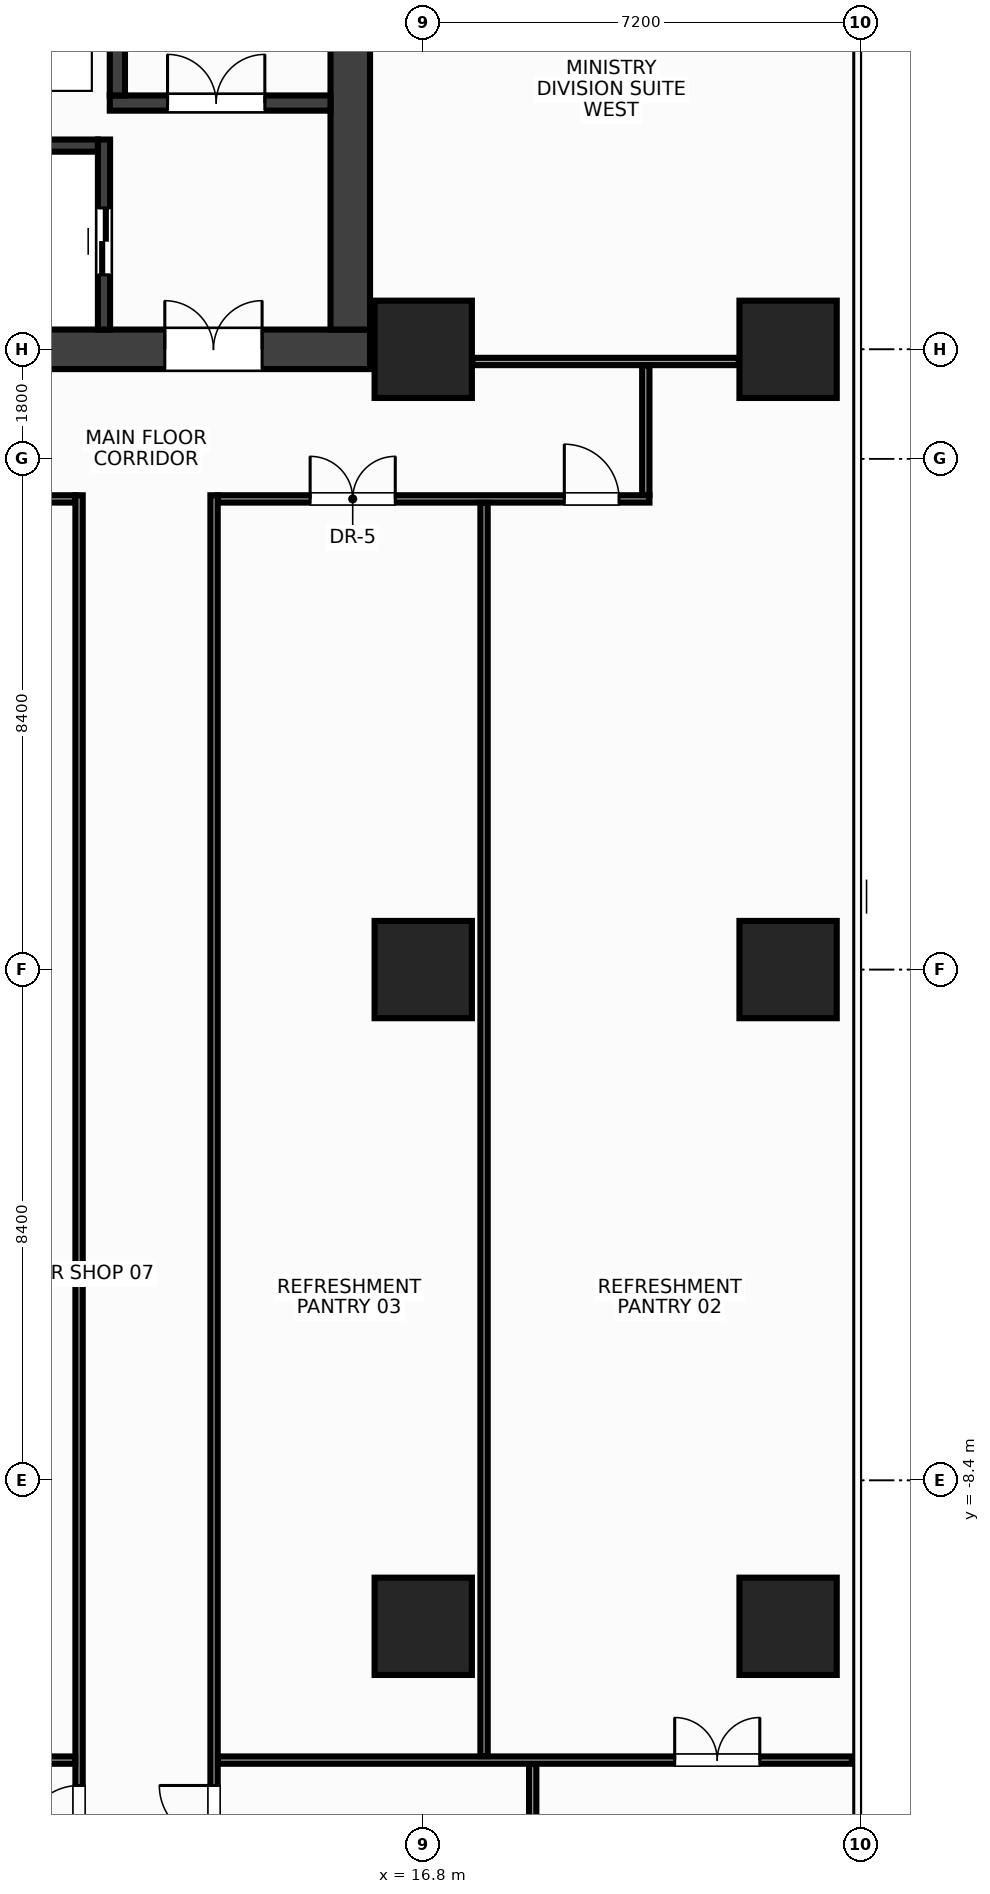
"""IFC4 building model, lengths in metres.
Left out: names, types, materials, properties, quantities, classifications, styles, units other than length and angle.
Written with IfcOpenShell. Run it as: python <this file> out.ifc"""

import sys

from ifc_helpers import new_model, si_unit, direction, frame, frame_2d, origin, origin_2d, place, context, subcontext, project, spatial, rectangle, extrude, source, transform, mapped, element, fill, save


model = new_model("IFC4")
c1 = context("Model", 3, precision=1e-05, world=origin(), true_north=direction((0.0, 1.0)))
c2 = subcontext(c1, "Body", "Model", "MODEL_VIEW")
j1 = project(units=[si_unit("LENGTHUNIT", "METRE"), si_unit("PLANEANGLEUNIT", "RADIAN")], contexts=[c1])
p1 = place(None, origin())
s1 = spatial("IfcSite", under=j1, at=p1, CompositionType="ELEMENT")
p2 = place(p1, origin())
s2 = spatial("IfcBuilding", under=s1, at=p2, CompositionType="ELEMENT")
p3 = place(p2, frame((0.0, 0.0, 178.4)))
s3 = spatial("IfcBuildingStorey", under=s2, at=p3, CompositionType="ELEMENT", Elevation=178.4)
m1 = source(origin(), c2, "Body", "SweptSolid", [
    extrude(rectangle(XDim=31.85, YDim=0.65, at=frame_2d((15.925, 0.0))), origin(), (0.0, 0.0, 1.0), 3.6),
])
p4 = place(p3, frame((-15.925, 10.2, 0.0), z_axis=(0.0, 0.0, 1.0), x_axis=(1.0, 0.0, 0.0)))
e1 = element("IfcWall", 1, at=p4, inside=s3, PredefinedType="SHEAR", context=c2, shape_type="MappedRepresentation", body=[
    mapped(m1, transform((0.0, 0.0, 0.0), x_axis=(1.0, 0.0, 0.0), y_axis=(0.0, 1.0, 0.0), z_axis=(0.0, 0.0, 1.0), scale=1.0)),
])
p5 = place(p4, frame((1.775, 0.0, 0.0)))
e2 = element("IfcOpeningElement", 2, at=p5, cuts=e1, PredefinedType="OPENING", context=c2, shape_type="SweptSolid", body=[
    extrude(rectangle(XDim=1.6, YDim=2.15, at=frame_2d((0.8, 1.075))), frame((0.0, 0.337, 0.0), z_axis=(0.0, -1.0, 0.0), x_axis=(1.0, 0.0, 0.0)), (0.0, 0.0, 1.0), 0.674),
])
p6 = place(p4, frame((28.475, 0.0, 0.0)))
e3 = element("IfcOpeningElement", 3, at=p6, cuts=e1, PredefinedType="OPENING", context=c2, shape_type="SweptSolid", body=[
    extrude(rectangle(XDim=1.6, YDim=2.15, at=frame_2d((0.8, 1.075))), frame((0.0, 0.337, 0.0), z_axis=(0.0, -1.0, 0.0), x_axis=(1.0, 0.0, 0.0)), (0.0, 0.0, 1.0), 0.674),
])
p7 = place(p4, frame((15.175, 0.0, 0.0)))
e4 = element("IfcOpeningElement", 4, at=p7, cuts=e1, PredefinedType="OPENING", context=c2, shape_type="SweptSolid", body=[
    extrude(rectangle(XDim=1.5, YDim=2.2, at=frame_2d((0.75, 1.1))), frame((0.0, 0.337, 0.0), z_axis=(0.0, -1.0, 0.0), x_axis=(1.0, 0.0, 0.0)), (0.0, 0.0, 1.0), 0.674),
])
m2 = source(origin(), c2, "Body", "SweptSolid", [
    extrude(rectangle(XDim=12.95, YDim=0.65, at=frame_2d((6.475, 0.0))), origin(), (0.0, 0.0, 1.0), 3.6),
])
p8 = place(p3, frame((15.6, 10.525, 0.0), z_axis=(0.0, 0.0, 1.0), x_axis=(0.0, 1.0, 0.0)))
e5 = element("IfcWall", 5, at=p8, inside=s3, PredefinedType="SHEAR", context=c2, shape_type="MappedRepresentation", body=[
    mapped(m2, transform((0.0, 0.0, 0.0), x_axis=(1.0, 0.0, 0.0), y_axis=(0.0, 1.0, 0.0), z_axis=(0.0, 0.0, 1.0), scale=1.0)),
])
m3 = source(origin(), c2, "Body", "SweptSolid", [
    extrude(rectangle(XDim=3.63, YDim=0.25, at=frame_2d((1.815, 0.0))), origin(), (0.0, 0.0, 1.0), 3.6),
])
p9 = place(p3, frame((11.645, 14.25, 0.0), z_axis=(0.0, 0.0, 1.0), x_axis=(1.0, 0.0, 0.0)))
e6 = element("IfcWall", 6, at=p9, inside=s3, PredefinedType="SHEAR", context=c2, shape_type="MappedRepresentation", body=[
    mapped(m3, transform((0.0, 0.0, 0.0), x_axis=(1.0, 0.0, 0.0), y_axis=(0.0, 1.0, 0.0), z_axis=(0.0, 0.0, 1.0), scale=1.0)),
])
p10 = place(p9, frame((0.95, 0.0, 0.0)))
e7 = element("IfcOpeningElement", 7, at=p10, cuts=e6, PredefinedType="OPENING", context=c2, shape_type="SweptSolid", body=[
    extrude(rectangle(XDim=1.6, YDim=2.15, at=frame_2d((0.8, 1.075))), frame((0.0, 0.137, 0.0), z_axis=(0.0, -1.0, 0.0), x_axis=(1.0, 0.0, 0.0)), (0.0, 0.0, 1.0), 0.274),
])
m4 = source(origin(), c2, "Body", "SweptSolid", [
    extrude(rectangle(XDim=9.1, YDim=0.25, at=frame_2d((4.55, 0.0))), origin(), (0.0, 0.0, 1.0), 3.6),
])
p11 = place(p3, frame((11.77, 14.375, 0.0), z_axis=(0.0, 0.0, 1.0), x_axis=(0.0, 1.0, 0.0)))
e8 = element("IfcWall", 8, at=p11, inside=s3, PredefinedType="SHEAR", context=c2, shape_type="MappedRepresentation", body=[
    mapped(m4, transform((0.0, 0.0, 0.0), x_axis=(1.0, 0.0, 0.0), y_axis=(0.0, 1.0, 0.0), z_axis=(0.0, 0.0, 1.0), scale=1.0)),
])
m5 = source(origin(), c2, "Body", "SweptSolid", [
    extrude(rectangle(XDim=3.125, YDim=0.2, at=frame_2d((1.562, 0.0))), origin(), (0.0, 0.0, 1.0), 3.6),
])
p12 = place(p3, frame((11.55, 10.525, 0.0), z_axis=(0.0, 0.0, 1.0), x_axis=(0.0, 1.0, 0.0)))
e9 = element("IfcWall", 9, at=p12, inside=s3, PredefinedType="SHEAR", context=c2, shape_type="MappedRepresentation", body=[
    mapped(m5, transform((0.0, 0.0, 0.0), x_axis=(1.0, 0.0, 0.0), y_axis=(0.0, 1.0, 0.0), z_axis=(0.0, 0.0, 1.0), scale=1.0)),
])
p13 = place(p12, frame((0.9, 0.0, 0.0)))
e10 = element("IfcOpeningElement", 10, at=p13, cuts=e9, PredefinedType="OPENING", context=c2, shape_type="SweptSolid", body=[
    extrude(rectangle(XDim=1.1, YDim=2.15, at=frame_2d((0.55, 1.075))), frame((0.0, 0.112, 0.0), z_axis=(0.0, -1.0, 0.0), x_axis=(1.0, 0.0, 0.0)), (0.0, 0.0, 1.0), 0.224),
])
m6 = source(origin(), c2, "Body", "SweptSolid", [
    extrude(rectangle(XDim=2.825, YDim=0.2, at=frame_2d((1.413, 0.0))), origin(), (0.0, 0.0, 1.0), 3.6),
])
p14 = place(p3, frame((8.625, 13.55, 0.0), z_axis=(0.0, 0.0, 1.0), x_axis=(1.0, 0.0, 0.0)))
e11 = element("IfcWall", 11, at=p14, inside=s3, PredefinedType="SHEAR", context=c2, shape_type="MappedRepresentation", body=[
    mapped(m6, transform((0.0, 0.0, 0.0), x_axis=(1.0, 0.0, 0.0), y_axis=(0.0, 1.0, 0.0), z_axis=(0.0, 0.0, 1.0), scale=1.0)),
])
m7 = source(origin(), c2, "Body", "SweptSolid", [
    extrude(rectangle(XDim=1.6, YDim=1.6, at=origin_2d()), origin(), (0.0, 0.0, 1.0), 3.6),
])
for number, where, z_axis, x_axis in (
    (12, (16.8, -10.8, 0.0), (0.0, 0.0, 1.0), (1.0, 0.0, 0.0)),
    (13, (16.8, 0.0, 0.0), (0.0, 0.0, 1.0), (1.0, 0.0, 0.0)),
    (14, (16.8, 10.2, 0.0), (0.0, 0.0, 1.0), (1.0, 0.0, 0.0)),
    (15, (22.8, -10.8, 0.0), (0.0, 0.0, 1.0), (1.0, 0.0, 0.0)),
    (16, (22.8, 0.0, 0.0), (0.0, 0.0, 1.0), (1.0, 0.0, 0.0)),
    (17, (22.8, 10.2, 0.0), (0.0, 0.0, 1.0), (1.0, 0.0, 0.0)),
):
    element("IfcColumn", number, at=place(p3, frame(where, z_axis=z_axis, x_axis=x_axis)), inside=s3, PredefinedType="COLUMN", context=c2, shape_type="MappedRepresentation", body=[
        mapped(m7, transform((0.0, 0.0, 0.0), x_axis=(1.0, 0.0, 0.0), y_axis=(0.0, 1.0, 0.0), z_axis=(0.0, 0.0, 1.0), scale=1.0)),
    ])
m8 = source(origin(), c2, "Body", "SweptSolid", [
    extrude(rectangle(XDim=4.38, YDim=0.12, at=frame_2d((2.19, 0.0))), origin(), (0.0, 0.0, 1.0), 2.915),
])
p15 = place(p3, frame((17.61, 10.0, 0.0), z_axis=(0.0, 0.0, 1.0), x_axis=(1.0, 0.0, 0.0)))
e18 = element("IfcWall", 18, at=p15, inside=s3, PredefinedType="PARTITIONING", context=c2, shape_type="MappedRepresentation", body=[
    mapped(m8, transform((0.0, 0.0, 0.0), x_axis=(1.0, 0.0, 0.0), y_axis=(0.0, 1.0, 0.0), z_axis=(0.0, 0.0, 1.0), scale=1.0)),
])
m9 = source(origin(), c2, "Body", "SweptSolid", [
    extrude(rectangle(XDim=31.6, YDim=0.12, at=frame_2d((15.8, 0.0))), origin(), (0.0, 0.0, 1.0), 2.765),
])
p16 = place(p3, frame((-20.52, 7.74, 0.0), z_axis=(0.0, 0.0, 1.0), x_axis=(1.0, 0.0, 0.0)))
e19 = element("IfcWall", 19, at=p16, inside=s3, PredefinedType="PARTITIONING", context=c2, shape_type="MappedRepresentation", body=[
    mapped(m9, transform((0.0, 0.0, 0.0), x_axis=(1.0, 0.0, 0.0), y_axis=(0.0, 1.0, 0.0), z_axis=(0.0, 0.0, 1.0), scale=1.0)),
])
p17 = place(p16, frame((0.5, 0.0, 0.0)))
e20 = element("IfcOpeningElement", 20, at=p17, cuts=e19, PredefinedType="OPENING", context=c2, shape_type="SweptSolid", body=[
    extrude(rectangle(XDim=0.9, YDim=2.15, at=frame_2d((0.45, 1.075))), frame((0.0, 0.072, 0.0), z_axis=(0.0, -1.0, 0.0), x_axis=(1.0, 0.0, 0.0)), (0.0, 0.0, 1.0), 0.144),
])
p18 = place(p16, frame((6.4, 0.0, 0.0)))
e21 = element("IfcOpeningElement", 21, at=p18, cuts=e19, PredefinedType="OPENING", context=c2, shape_type="SweptSolid", body=[
    extrude(rectangle(XDim=1.4, YDim=2.2, at=frame_2d((0.7, 1.1))), frame((0.0, 0.072, 0.0), z_axis=(0.0, -1.0, 0.0), x_axis=(1.0, 0.0, 0.0)), (0.0, 0.0, 1.0), 0.144),
])
p19 = place(p16, frame((15.52, 0.0, 0.0)))
e22 = element("IfcOpeningElement", 22, at=p19, cuts=e19, PredefinedType="OPENING", context=c2, shape_type="SweptSolid", body=[
    extrude(rectangle(XDim=1.4, YDim=2.2, at=frame_2d((0.7, 1.1))), frame((0.0, 0.072, 0.0), z_axis=(0.0, -1.0, 0.0), x_axis=(1.0, 0.0, 0.0)), (0.0, 0.0, 1.0), 0.144),
])
p20 = place(p16, frame((24.12, 0.0, 0.0)))
e23 = element("IfcOpeningElement", 23, at=p20, cuts=e19, PredefinedType="OPENING", context=c2, shape_type="SweptSolid", body=[
    extrude(rectangle(XDim=1.4, YDim=2.2, at=frame_2d((0.7, 1.1))), frame((0.0, 0.072, 0.0), z_axis=(0.0, -1.0, 0.0), x_axis=(1.0, 0.0, 0.0)), (0.0, 0.0, 1.0), 0.144),
])
p21 = place(p16, frame((29.63, 0.0, 0.0)))
e24 = element("IfcOpeningElement", 24, at=p21, cuts=e19, PredefinedType="OPENING", context=c2, shape_type="SweptSolid", body=[
    extrude(rectangle(XDim=1.4, YDim=2.2, at=frame_2d((0.7, 1.1))), frame((0.0, 0.072, 0.0), z_axis=(0.0, -1.0, 0.0), x_axis=(1.0, 0.0, 0.0)), (0.0, 0.0, 1.0), 0.144),
])
m10 = source(origin(), c2, "Body", "SweptSolid", [
    extrude(rectangle(XDim=7.1, YDim=0.12, at=frame_2d((3.55, 0.0))), origin(), (0.0, 0.0, 1.0), 2.765),
])
p22 = place(p3, frame((13.42, 7.74, 0.0), z_axis=(0.0, 0.0, 1.0), x_axis=(1.0, 0.0, 0.0)))
e25 = element("IfcWall", 25, at=p22, inside=s3, PredefinedType="PARTITIONING", context=c2, shape_type="MappedRepresentation", body=[
    mapped(m10, transform((0.0, 0.0, 0.0), x_axis=(1.0, 0.0, 0.0), y_axis=(0.0, 1.0, 0.0), z_axis=(0.0, 0.0, 1.0), scale=1.0)),
])
p23 = place(p22, frame((5.7, 0.0, 0.0)))
e26 = element("IfcOpeningElement", 26, at=p23, cuts=e25, PredefinedType="OPENING", context=c2, shape_type="SweptSolid", body=[
    extrude(rectangle(XDim=0.9, YDim=2.15, at=frame_2d((0.45, 1.075))), frame((0.0, 0.072, 0.0), z_axis=(0.0, -1.0, 0.0), x_axis=(1.0, 0.0, 0.0)), (0.0, 0.0, 1.0), 0.144),
])
p24 = place(p22, frame((1.52, 0.0, 0.0)))
e27 = element("IfcOpeningElement", 27, at=p24, cuts=e25, PredefinedType="OPENING", context=c2, shape_type="SweptSolid", body=[
    extrude(rectangle(XDim=1.4, YDim=2.2, at=frame_2d((0.7, 1.1))), frame((0.0, 0.072, 0.0), z_axis=(0.0, -1.0, 0.0), x_axis=(1.0, 0.0, 0.0)), (0.0, 0.0, 1.0), 0.144),
])
m11 = source(origin(), c2, "Body", "SweptSolid", [
    extrude(rectangle(XDim=2.13, YDim=0.12, at=frame_2d((1.065, 0.0))), origin(), (0.0, 0.0, 1.0), 3.38),
])
p25 = place(p3, frame((20.46, 7.805, 0.0), z_axis=(0.0, 0.0, 1.0), x_axis=(0.0, 1.0, 0.0)))
e28 = element("IfcWall", 28, at=p25, inside=s3, PredefinedType="PARTITIONING", context=c2, shape_type="MappedRepresentation", body=[
    mapped(m11, transform((0.0, 0.0, 0.0), x_axis=(1.0, 0.0, 0.0), y_axis=(0.0, 1.0, 0.0), z_axis=(0.0, 0.0, 1.0), scale=1.0)),
])
m12 = source(origin(), c2, "Body", "SweptSolid", [
    extrude(rectangle(XDim=22.595, YDim=0.12, at=frame_2d((11.297, 0.0))), origin(), (0.0, 0.0, 1.0), 2.665),
])
p26 = place(p3, frame((11.14, -14.795, 0.0), z_axis=(0.0, 0.0, 1.0), x_axis=(0.0, 1.0, 0.0)))
e29 = element("IfcWall", 29, at=p26, inside=s3, PredefinedType="PARTITIONING", context=c2, shape_type="MappedRepresentation", body=[
    mapped(m12, transform((0.0, 0.0, 0.0), x_axis=(1.0, 0.0, 0.0), y_axis=(0.0, 1.0, 0.0), z_axis=(0.0, 0.0, 1.0), scale=1.0)),
])
p27 = place(p26, frame((0.478, 0.0, 0.0)))
e30 = element("IfcOpeningElement", 30, at=p27, cuts=e29, PredefinedType="OPENING", context=c2, shape_type="SweptSolid", body=[
    extrude(rectangle(XDim=0.9, YDim=2.15, at=frame_2d((0.45, 1.075))), frame((0.0, 0.072, 0.0), z_axis=(0.0, -1.0, 0.0), x_axis=(1.0, 0.0, 0.0)), (0.0, 0.0, 1.0), 0.144),
])
p28 = place(p3, frame((13.36, -14.795, 0.0), z_axis=(0.0, 0.0, 1.0), x_axis=(0.0, 1.0, 0.0)))
e31 = element("IfcWall", 31, at=p28, inside=s3, PredefinedType="PARTITIONING", context=c2, shape_type="MappedRepresentation", body=[
    mapped(m12, transform((0.0, 0.0, 0.0), x_axis=(1.0, 0.0, 0.0), y_axis=(0.0, 1.0, 0.0), z_axis=(0.0, 0.0, 1.0), scale=1.0)),
])
p29 = place(p28, frame((0.478, 0.0, 0.0)))
e32 = element("IfcOpeningElement", 32, at=p29, cuts=e31, PredefinedType="OPENING", context=c2, shape_type="SweptSolid", body=[
    extrude(rectangle(XDim=0.9, YDim=2.15, at=frame_2d((0.45, 1.075))), frame((0.0, 0.072, 0.0), z_axis=(0.0, -1.0, 0.0), x_axis=(1.0, 0.0, 0.0)), (0.0, 0.0, 1.0), 0.144),
])
m13 = source(origin(), c2, "Body", "SweptSolid", [
    extrude(rectangle(XDim=34.925, YDim=0.12, at=frame_2d((17.462, 0.0))), origin(), (0.0, 0.0, 1.0), 2.965),
])
p30 = place(p3, frame((-23.85, -13.0, 0.0), z_axis=(0.0, 0.0, 1.0), x_axis=(1.0, 0.0, 0.0)))
e33 = element("IfcWall", 33, at=p30, inside=s3, PredefinedType="PARTITIONING", context=c2, shape_type="MappedRepresentation", body=[
    mapped(m13, transform((0.0, 0.0, 0.0), x_axis=(1.0, 0.0, 0.0), y_axis=(0.0, 1.0, 0.0), z_axis=(0.0, 0.0, 1.0), scale=1.0)),
])
p31 = place(p30, frame((1.515, 0.0, 0.0)))
e34 = element("IfcOpeningElement", 34, at=p31, cuts=e33, PredefinedType="OPENING", context=c2, shape_type="SweptSolid", body=[
    extrude(rectangle(XDim=1.4, YDim=2.2, at=frame_2d((0.7, 1.1))), frame((0.0, 0.072, 0.0), z_axis=(0.0, -1.0, 0.0), x_axis=(1.0, 0.0, 0.0)), (0.0, 0.0, 1.0), 0.144),
])
p32 = place(p30, frame((8.15, 0.0, 0.0)))
e35 = element("IfcOpeningElement", 35, at=p32, cuts=e33, PredefinedType="OPENING", context=c2, shape_type="SweptSolid", body=[
    extrude(rectangle(XDim=1.4, YDim=2.2, at=frame_2d((0.7, 1.1))), frame((0.0, 0.072, 0.0), z_axis=(0.0, -1.0, 0.0), x_axis=(1.0, 0.0, 0.0)), (0.0, 0.0, 1.0), 0.144),
])
m14 = source(origin(), c2, "Body", "SweptSolid", [
    extrude(rectangle(XDim=10.425, YDim=0.12, at=frame_2d((5.212, 0.0))), origin(), (0.0, 0.0, 1.0), 2.965),
])
p33 = place(p3, frame((13.425, -13.0, 0.0), z_axis=(0.0, 0.0, 1.0), x_axis=(1.0, 0.0, 0.0)))
e36 = element("IfcWall", 36, at=p33, inside=s3, PredefinedType="PARTITIONING", context=c2, shape_type="MappedRepresentation", body=[
    mapped(m14, transform((0.0, 0.0, 0.0), x_axis=(1.0, 0.0, 0.0), y_axis=(0.0, 1.0, 0.0), z_axis=(0.0, 0.0, 1.0), scale=1.0)),
])
p34 = place(p33, frame((7.51, 0.0, 0.0)))
e37 = element("IfcOpeningElement", 37, at=p34, cuts=e36, PredefinedType="OPENING", context=c2, shape_type="SweptSolid", body=[
    extrude(rectangle(XDim=1.4, YDim=2.2, at=frame_2d((0.7, 1.1))), frame((0.0, 0.072, 0.0), z_axis=(0.0, -1.0, 0.0), x_axis=(1.0, 0.0, 0.0)), (0.0, 0.0, 1.0), 0.144),
])
m15 = source(origin(), c2, "Body", "SweptSolid", [
    extrude(rectangle(XDim=20.61, YDim=0.12, at=frame_2d((10.305, 0.0))), origin(), (0.0, 0.0, 1.0), 2.915),
])
p35 = place(p3, frame((17.8, -12.935, 0.0), z_axis=(0.0, 0.0, 1.0), x_axis=(0.0, 1.0, 0.0)))
e38 = element("IfcWall", 38, at=p35, inside=s3, PredefinedType="PARTITIONING", context=c2, shape_type="MappedRepresentation", body=[
    mapped(m15, transform((0.0, 0.0, 0.0), x_axis=(1.0, 0.0, 0.0), y_axis=(0.0, 1.0, 0.0), z_axis=(0.0, 0.0, 1.0), scale=1.0)),
])
m16 = source(origin(), c2, "Body", "SweptSolid", [
    extrude(rectangle(XDim=4.597, YDim=0.12, at=frame_2d((2.299, 0.0))), origin(), (0.0, 0.0, 1.0), 3.38),
])
p36 = place(p3, frame((18.6, -17.662, 0.0), z_axis=(0.0, 0.0, 1.0), x_axis=(0.0, 1.0, 0.0)))
e39 = element("IfcWall", 39, at=p36, inside=s3, PredefinedType="PARTITIONING", context=c2, shape_type="MappedRepresentation", body=[
    mapped(m16, transform((0.0, 0.0, 0.0), x_axis=(1.0, 0.0, 0.0), y_axis=(0.0, 1.0, 0.0), z_axis=(0.0, 0.0, 1.0), scale=1.0)),
])
m17 = source(origin(), c2, "Body", "SweptSolid", [
    extrude(rectangle(XDim=1.6, YDim=2.15, at=frame_2d((0.8, 1.075))), frame((0.0, 0.025, 0.0), z_axis=(0.0, -1.0, 0.0), x_axis=(1.0, 0.0, 0.0)), (0.0, 0.0, 1.0), 0.05),
])
p37 = place(p10, origin())
e40 = element("IfcDoor", 40, at=p37, inside=s3, OperationType="DOUBLE_DOOR_SINGLE_SWING", PredefinedType="DOOR", context=c2, shape_type="MappedRepresentation", body=[
    mapped(m17, transform((0.0, 0.0, 0.0), x_axis=(1.0, 0.0, 0.0), y_axis=(0.0, 1.0, 0.0), z_axis=(0.0, 0.0, 1.0), scale=1.0)),
])
fill(e7, e40)
p38 = place(p6, origin())
e41 = element("IfcDoor", 41, at=p38, inside=s3, OperationType="DOUBLE_DOOR_SINGLE_SWING", PredefinedType="DOOR", context=c2, shape_type="MappedRepresentation", body=[
    mapped(m17, transform((0.0, 0.0, 0.0), x_axis=(1.0, 0.0, 0.0), y_axis=(0.0, 1.0, 0.0), z_axis=(0.0, 0.0, 1.0), scale=1.0)),
])
fill(e3, e41)
m18 = source(origin(), c2, "Body", "SweptSolid", [
    extrude(rectangle(XDim=1.1, YDim=2.15, at=frame_2d((0.55, 1.075))), frame((0.0, 0.025, 0.0), z_axis=(0.0, -1.0, 0.0), x_axis=(1.0, 0.0, 0.0)), (0.0, 0.0, 1.0), 0.05),
])
p39 = place(p13, origin())
e42 = element("IfcDoor", 42, at=p39, inside=s3, OperationType="DOUBLE_DOOR_SLIDING", PredefinedType="DOOR", context=c2, shape_type="MappedRepresentation", body=[
    mapped(m18, transform((0.0, 0.0, 0.0), x_axis=(1.0, 0.0, 0.0), y_axis=(0.0, 1.0, 0.0), z_axis=(0.0, 0.0, 1.0), scale=1.0)),
])
fill(e10, e42)
m19 = source(origin(), c2, "Body", "SweptSolid", [
    extrude(rectangle(XDim=0.9, YDim=2.15, at=frame_2d((0.45, 1.075))), frame((0.0, 0.025, 0.0), z_axis=(0.0, -1.0, 0.0), x_axis=(1.0, 0.0, 0.0)), (0.0, 0.0, 1.0), 0.05),
])
p40 = place(p23, origin())
e43 = element("IfcDoor", 43, at=p40, inside=s3, OperationType="SINGLE_SWING_LEFT", PredefinedType="DOOR", context=c2, shape_type="MappedRepresentation", body=[
    mapped(m19, transform((0.0, 0.0, 0.0), x_axis=(1.0, 0.0, 0.0), y_axis=(0.0, 1.0, 0.0), z_axis=(0.0, 0.0, 1.0), scale=1.0)),
])
fill(e26, e43)
m20 = source(origin(), c2, "Body", "SweptSolid", [
    extrude(rectangle(XDim=1.4, YDim=2.2, at=frame_2d((0.7, 1.1))), frame((0.0, 0.025, 0.0), z_axis=(0.0, -1.0, 0.0), x_axis=(1.0, 0.0, 0.0)), (0.0, 0.0, 1.0), 0.05),
])
p41 = place(p24, origin())
e44 = element("IfcDoor", 44, at=p41, inside=s3, OperationType="DOUBLE_DOOR_SINGLE_SWING", PredefinedType="DOOR", context=c2, shape_type="MappedRepresentation", body=[
    mapped(m20, transform((0.0, 0.0, 0.0), x_axis=(1.0, 0.0, 0.0), y_axis=(0.0, 1.0, 0.0), z_axis=(0.0, 0.0, 1.0), scale=1.0)),
])
fill(e27, e44)
p42 = place(p27, origin())
e45 = element("IfcDoor", 45, at=p42, inside=s3, OperationType="SINGLE_SWING_LEFT", PredefinedType="DOOR", context=c2, shape_type="MappedRepresentation", body=[
    mapped(m19, transform((0.0, 0.0, 0.0), x_axis=(1.0, 0.0, 0.0), y_axis=(0.0, 1.0, 0.0), z_axis=(0.0, 0.0, 1.0), scale=1.0)),
])
fill(e30, e45)
p43 = place(p29, origin())
e46 = element("IfcDoor", 46, at=p43, inside=s3, OperationType="SINGLE_SWING_RIGHT", PredefinedType="DOOR", context=c2, shape_type="MappedRepresentation", body=[
    mapped(m19, transform((0.0, 0.0, 0.0), x_axis=(1.0, 0.0, 0.0), y_axis=(0.0, 1.0, 0.0), z_axis=(0.0, 0.0, 1.0), scale=1.0)),
])
fill(e32, e46)
p44 = place(p34, origin())
e47 = element("IfcDoor", 47, at=p44, inside=s3, OperationType="DOUBLE_DOOR_SINGLE_SWING", PredefinedType="DOOR", context=c2, shape_type="MappedRepresentation", body=[
    mapped(m20, transform((0.0, 0.0, 0.0), x_axis=(1.0, 0.0, 0.0), y_axis=(0.0, 1.0, 0.0), z_axis=(0.0, 0.0, 1.0), scale=1.0)),
])
fill(e37, e47)
save(model, sys.argv[1])
